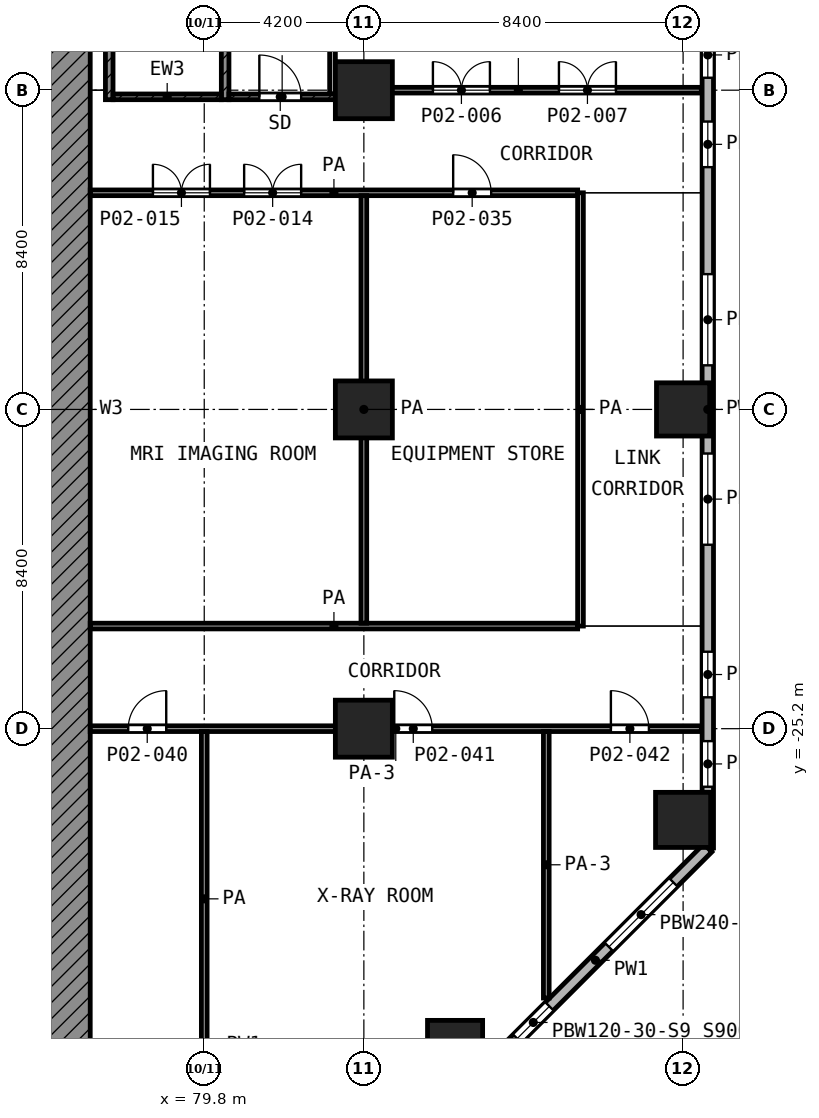
"""IFC4 building model, lengths in metres.
Left out: names, types, materials, properties, quantities, classifications, styles, units other than length and angle.
Written with IfcOpenShell. Run it as: python <this file> out.ifc"""

import sys

from ifc_helpers import new_model, si_unit, direction, frame, frame_2d, origin, origin_2d, place, context, subcontext, project, spatial, polyline, rectangle, outline, extrude, element, fill, save


model = new_model("IFC4")
c1 = context("Model", 3, precision=1e-05, world=origin(), true_north=direction((0.0, 1.0)))
c2 = subcontext(c1, "Body", "Model", "MODEL_VIEW")
j1 = project(units=[si_unit("LENGTHUNIT", "METRE"), si_unit("PLANEANGLEUNIT", "RADIAN")], contexts=[c1])
p1 = place(None, origin())
s1 = spatial("IfcSite", under=j1, at=p1, CompositionType="ELEMENT")
p2 = place(p1, origin())
s2 = spatial("IfcBuilding", under=s1, at=p2, CompositionType="ELEMENT")
p3 = place(p2, frame((0.0, 0.0, 7.0)))
s3 = spatial("IfcBuildingStorey", under=s2, at=p3, CompositionType="ELEMENT", Elevation=7.0)
for number, where, z_axis, x_axis in (
    (1, (84.0, -8.4, 0.0), (0.0, 0.0, 1.0), (1.0, 0.0, 0.0)),
    (2, (84.0, -16.8, 0.0), (0.0, 0.0, 1.0), (1.0, 0.0, 0.0)),
):
    element("IfcColumn", number, at=place(p3, frame(where, z_axis=z_axis, x_axis=x_axis)), inside=s3, PredefinedType="COLUMN", context=c2, shape_type="SweptSolid", body=[
        extrude(rectangle(XDim=1.5, YDim=1.5, at=origin_2d()), origin(), (0.0, 0.0, 1.0), 5.6),
    ])
p4 = place(p3, frame((92.4, -16.8, 0.0), z_axis=(0.0, 0.0, 1.0), x_axis=(1.0, 0.0, 0.0)))
e3 = element("IfcColumn", 3, at=p4, inside=s3, PredefinedType="COLUMN", context=c2, shape_type="SweptSolid", body=[
    extrude(rectangle(XDim=1.4, YDim=1.4, at=origin_2d()), origin(), (0.0, 0.0, 1.0), 5.6),
])
p5 = place(p3, frame((84.0, -25.2, 0.0), z_axis=(0.0, 0.0, 1.0), x_axis=(1.0, 0.0, 0.0)))
e4 = element("IfcColumn", 4, at=p5, inside=s3, PredefinedType="COLUMN", context=c2, shape_type="SweptSolid", body=[
    extrude(rectangle(XDim=1.5, YDim=1.5, at=origin_2d()), origin(), (0.0, 0.0, 1.0), 5.6),
])
for number, where, z_axis, x_axis in (
    (5, (92.4, -27.6, 0.0), (0.0, 0.0, 1.0), (1.0, 0.0, 0.0)),
    (6, (86.4, -33.6, 0.0), (0.0, 0.0, 1.0), (1.0, 0.0, 0.0)),
):
    element("IfcColumn", number, at=place(p3, frame(where, z_axis=z_axis, x_axis=x_axis)), inside=s3, PredefinedType="COLUMN", context=c2, shape_type="SweptSolid", body=[
        extrude(rectangle(XDim=1.45, YDim=1.45, at=origin_2d()), origin(), (0.0, 0.0, 1.0), 5.6),
    ])
p6 = place(p3, frame((0.0, 0.0, -7.0), z_axis=(0.0, -1.0, 0.0), x_axis=(1.0, 0.0, 0.0)))
e7 = element("IfcWall", 7, at=p6, inside=s3, PredefinedType="SHEAR", context=c2, shape_type="SweptSolid", body=[
    extrude(outline(polyline([(74.4, 7.0), (74.4, 9.0), (74.241, 11.256), (73.952, 12.6), (76.8, 12.6), (76.8, 7.0), (74.4, 7.0)])), origin(), (0.0, 0.0, 1.0), 33.6),
])
p7 = place(p3, frame((93.05, -28.338, 0.0), z_axis=(0.0, 0.0, 1.0), x_axis=(0.0, 1.0, 0.0)))
e8 = element("IfcWall", 8, at=p7, inside=s3, PredefinedType="SOLIDWALL", context=c2, shape_type="SweptSolid", body=[
    extrude(rectangle(XDim=23.076, YDim=0.3, at=frame_2d((11.538, 0.0))), origin(), (0.0, 0.0, 1.0), 5.25),
])
p8 = place(p7, frame((1.61, 0.0, 0.9)))
e9 = element("IfcOpeningElement", 9, at=p8, cuts=e8, PredefinedType="OPENING", context=c2, shape_type="SweptSolid", body=[
    extrude(rectangle(XDim=1.2, YDim=3.0, at=frame_2d((0.6, 1.5))), frame((0.0, 0.16, 0.0), z_axis=(0.0, -1.0, 0.0), x_axis=(1.0, 0.0, 0.0)), (0.0, 0.0, 1.0), 0.32),
])
p9 = place(p7, frame((3.963, 0.0, 0.9)))
e10 = element("IfcOpeningElement", 10, at=p9, cuts=e8, PredefinedType="OPENING", context=c2, shape_type="SweptSolid", body=[
    extrude(rectangle(XDim=1.2, YDim=3.0, at=frame_2d((0.6, 1.5))), frame((0.0, 0.16, 0.0), z_axis=(0.0, -1.0, 0.0), x_axis=(1.0, 0.0, 0.0)), (0.0, 0.0, 1.0), 0.32),
])
p10 = place(p7, frame((7.978, 0.0, 0.9)))
e11 = element("IfcOpeningElement", 11, at=p10, cuts=e8, PredefinedType="OPENING", context=c2, shape_type="SweptSolid", body=[
    extrude(rectangle(XDim=2.4, YDim=3.0, at=frame_2d((1.2, 1.5))), frame((0.0, 0.16, 0.0), z_axis=(0.0, -1.0, 0.0), x_axis=(1.0, 0.0, 0.0)), (0.0, 0.0, 1.0), 0.32),
])
p11 = place(p7, frame((12.698, 0.0, 0.9)))
e12 = element("IfcOpeningElement", 12, at=p11, cuts=e8, PredefinedType="OPENING", context=c2, shape_type="SweptSolid", body=[
    extrude(rectangle(XDim=2.4, YDim=3.0, at=frame_2d((1.2, 1.5))), frame((0.0, 0.16, 0.0), z_axis=(0.0, -1.0, 0.0), x_axis=(1.0, 0.0, 0.0)), (0.0, 0.0, 1.0), 0.32),
])
p12 = place(p7, frame((17.913, 0.0, 0.9)))
e13 = element("IfcOpeningElement", 13, at=p12, cuts=e8, PredefinedType="OPENING", context=c2, shape_type="SweptSolid", body=[
    extrude(rectangle(XDim=1.2, YDim=3.0, at=frame_2d((0.6, 1.5))), frame((0.0, 0.16, 0.0), z_axis=(0.0, -1.0, 0.0), x_axis=(1.0, 0.0, 0.0)), (0.0, 0.0, 1.0), 0.32),
])
p13 = place(p7, frame((20.265, 0.0, 0.9)))
e14 = element("IfcOpeningElement", 14, at=p13, cuts=e8, PredefinedType="OPENING", context=c2, shape_type="SweptSolid", body=[
    extrude(rectangle(XDim=1.2, YDim=3.0, at=frame_2d((0.6, 1.5))), frame((0.0, 0.16, 0.0), z_axis=(0.0, -1.0, 0.0), x_axis=(1.0, 0.0, 0.0)), (0.0, 0.0, 1.0), 0.32),
])
p14 = place(p3, frame((87.138, -34.25, 0.0), z_axis=(0.0, 0.0, 1.0), x_axis=(0.707106781187, 0.707106781187, 0.0)))
e15 = element("IfcWall", 15, at=p14, inside=s3, PredefinedType="SOLIDWALL", context=c2, shape_type="SweptSolid", body=[
    extrude(rectangle(XDim=8.361, YDim=0.3, at=frame_2d((4.181, 0.0))), origin(), (0.0, 0.0, 1.0), 5.25),
])
p15 = place(p14, frame((1.267, 0.0, 0.9)))
e16 = element("IfcOpeningElement", 16, at=p15, cuts=e15, PredefinedType="OPENING", context=c2, shape_type="SweptSolid", body=[
    extrude(rectangle(XDim=1.2, YDim=3.0, at=frame_2d((0.6, 1.5))), frame((0.0, 0.16, 0.0), z_axis=(0.0, -1.0, 0.0), x_axis=(1.0, 0.0, 0.0)), (0.0, 0.0, 1.0), 0.32),
])
p16 = place(p14, frame((4.679, 0.0, 0.9)))
e17 = element("IfcOpeningElement", 17, at=p16, cuts=e15, PredefinedType="OPENING", context=c2, shape_type="SweptSolid", body=[
    extrude(rectangle(XDim=2.4, YDim=3.0, at=frame_2d((1.2, 1.5))), frame((0.0, 0.16, 0.0), z_axis=(0.0, -1.0, 0.0), x_axis=(1.0, 0.0, 0.0)), (0.0, 0.0, 1.0), 0.32),
])
p17 = place(p3, frame((77.3, -8.65, 0.0), z_axis=(0.0, 0.0, 1.0), x_axis=(0.0, 1.0, 0.0)))
e18 = element("IfcWall", 18, at=p17, inside=s3, PredefinedType="SHEAR", context=c2, shape_type="SweptSolid", body=[
    extrude(rectangle(XDim=8.35, YDim=0.2, at=frame_2d((4.175, 0.0))), origin(), (0.0, 0.0, 1.0), 5.25),
])
p18 = place(p3, frame((80.35, -8.65, 0.0), z_axis=(0.0, 0.0, 1.0), x_axis=(0.0, 1.0, 0.0)))
e19 = element("IfcWall", 19, at=p18, inside=s3, PredefinedType="SHEAR", context=c2, shape_type="SweptSolid", body=[
    extrude(rectangle(XDim=8.35, YDim=0.2, at=frame_2d((4.175, 0.0))), origin(), (0.0, 0.0, 1.0), 5.25),
])
p19 = place(p18, frame((6.95, 0.0, 0.0)))
e20 = element("IfcOpeningElement", 20, at=p19, cuts=e19, PredefinedType="OPENING", context=c2, shape_type="SweptSolid", body=[
    extrude(rectangle(XDim=1.1, YDim=2.1, at=frame_2d((0.55, 1.05))), frame((0.0, 0.11, 0.0), z_axis=(0.0, -1.0, 0.0), x_axis=(1.0, 0.0, 0.0)), (0.0, 0.0, 1.0), 0.22),
])
p20 = place(p3, frame((77.4, -8.575, 0.0), z_axis=(0.0, 0.0, 1.0), x_axis=(1.0, 0.0, 0.0)))
e21 = element("IfcWall", 21, at=p20, inside=s3, PredefinedType="SHEAR", context=c2, shape_type="SweptSolid", body=[
    extrude(rectangle(XDim=2.85, YDim=0.15, at=frame_2d((1.425, 0.0))), origin(), (0.0, 0.0, 1.0), 5.25),
])
p21 = place(p3, frame((80.45, -8.575, 0.0), z_axis=(0.0, 0.0, 1.0), x_axis=(1.0, 0.0, 0.0)))
e22 = element("IfcWall", 22, at=p21, inside=s3, PredefinedType="SHEAR", context=c2, shape_type="SweptSolid", body=[
    extrude(rectangle(XDim=2.8, YDim=0.15, at=frame_2d((1.4, 0.0))), origin(), (0.0, 0.0, 1.0), 5.25),
])
p22 = place(p21, frame((0.8, 0.0, 0.0)))
e23 = element("IfcOpeningElement", 23, at=p22, cuts=e22, PredefinedType="OPENING", context=c2, shape_type="SweptSolid", body=[
    extrude(rectangle(XDim=1.1, YDim=2.1, at=frame_2d((0.55, 1.05))), frame((0.0, 0.085, 0.0), z_axis=(0.0, -1.0, 0.0), x_axis=(1.0, 0.0, 0.0)), (0.0, 0.0, 1.0), 0.17),
])
p23 = place(p3, frame((83.175, -8.5, 0.0), z_axis=(0.0, 0.0, 1.0), x_axis=(0.0, 1.0, 0.0)))
e24 = element("IfcWall", 24, at=p23, inside=s3, PredefinedType="PARTITIONING", context=c2, shape_type="SweptSolid", body=[
    extrude(rectangle(XDim=8.05, YDim=0.15, at=frame_2d((4.025, 0.0))), origin(), (0.0, 0.0, 1.0), 5.25),
])
p24 = place(p3, frame((76.8, -25.2, 0.0), z_axis=(0.0, 0.0, 1.0), x_axis=(1.0, 0.0, 0.0)))
e25 = element("IfcWall", 25, at=p24, inside=s3, PredefinedType="PARTITIONING", context=c2, shape_type="SweptSolid", body=[
    extrude(rectangle(XDim=16.08, YDim=0.15, at=frame_2d((8.04, 0.0))), origin(), (0.0, 0.0, 1.0), 3.85),
])
p25 = place(p24, frame((1.0, 0.0, 0.0)))
e26 = element("IfcOpeningElement", 26, at=p25, cuts=e25, PredefinedType="OPENING", context=c2, shape_type="SweptSolid", body=[
    extrude(rectangle(XDim=1.0, YDim=2.1, at=frame_2d((0.5, 1.05))), frame((0.0, 0.085, 0.0), z_axis=(0.0, -1.0, 0.0), x_axis=(1.0, 0.0, 0.0)), (0.0, 0.0, 1.0), 0.17),
])
p26 = place(p24, frame((8.0, 0.0, 0.0)))
e27 = element("IfcOpeningElement", 27, at=p26, cuts=e25, PredefinedType="OPENING", context=c2, shape_type="SweptSolid", body=[
    extrude(rectangle(XDim=1.0, YDim=2.1, at=frame_2d((0.5, 1.05))), frame((0.0, 0.085, 0.0), z_axis=(0.0, -1.0, 0.0), x_axis=(1.0, 0.0, 0.0)), (0.0, 0.0, 1.0), 0.17),
])
p27 = place(p24, frame((13.7, 0.0, 0.0)))
e28 = element("IfcOpeningElement", 28, at=p27, cuts=e25, PredefinedType="OPENING", context=c2, shape_type="SweptSolid", body=[
    extrude(rectangle(XDim=1.0, YDim=2.1, at=frame_2d((0.5, 1.05))), frame((0.0, 0.085, 0.0), z_axis=(0.0, -1.0, 0.0), x_axis=(1.0, 0.0, 0.0)), (0.0, 0.0, 1.0), 0.17),
])
p28 = place(p3, frame((76.8, -22.5, 0.0), z_axis=(0.0, 0.0, 1.0), x_axis=(1.0, 0.0, 0.0)))
e29 = element("IfcWall", 29, at=p28, inside=s3, PredefinedType="PARTITIONING", context=c2, shape_type="SweptSolid", body=[
    extrude(rectangle(XDim=12.825, YDim=0.15, at=frame_2d((6.413, 0.0))), origin(), (0.0, 0.0, 1.0), 5.25),
])
p29 = place(p3, frame((76.8, -11.1, 0.0), z_axis=(0.0, 0.0, 1.0), x_axis=(1.0, 0.0, 0.0)))
e30 = element("IfcWall", 30, at=p29, inside=s3, PredefinedType="PARTITIONING", context=c2, shape_type="SweptSolid", body=[
    extrude(rectangle(XDim=12.825, YDim=0.15, at=frame_2d((6.413, 0.0))), origin(), (0.0, 0.0, 1.0), 5.25),
])
p30 = place(p29, frame((4.05, 0.0, 0.0)))
e31 = element("IfcOpeningElement", 31, at=p30, cuts=e30, PredefinedType="OPENING", context=c2, shape_type="SweptSolid", body=[
    extrude(rectangle(XDim=1.5, YDim=2.1, at=frame_2d((0.75, 1.05))), frame((0.0, 0.085, 0.0), z_axis=(0.0, -1.0, 0.0), x_axis=(1.0, 0.0, 0.0)), (0.0, 0.0, 1.0), 0.17),
])
p31 = place(p29, frame((1.65, 0.0, 0.0)))
e32 = element("IfcOpeningElement", 32, at=p31, cuts=e30, PredefinedType="OPENING", context=c2, shape_type="SweptSolid", body=[
    extrude(rectangle(XDim=1.5, YDim=2.1, at=frame_2d((0.75, 1.05))), frame((0.0, 0.085, 0.0), z_axis=(0.0, -1.0, 0.0), x_axis=(1.0, 0.0, 0.0)), (0.0, 0.0, 1.0), 0.17),
])
p32 = place(p29, frame((9.55, 0.0, 0.0)))
e33 = element("IfcOpeningElement", 33, at=p32, cuts=e30, PredefinedType="OPENING", context=c2, shape_type="SweptSolid", body=[
    extrude(rectangle(XDim=1.0, YDim=2.1, at=frame_2d((0.5, 1.05))), frame((0.0, 0.085, 0.0), z_axis=(0.0, -1.0, 0.0), x_axis=(1.0, 0.0, 0.0)), (0.0, 0.0, 1.0), 0.17),
])
p33 = place(p3, frame((83.25, -8.4, 0.0), z_axis=(0.0, 0.0, 1.0), x_axis=(1.0, 0.0, 0.0)))
e34 = element("IfcWall", 34, at=p33, inside=s3, PredefinedType="PARTITIONING", context=c2, shape_type="SweptSolid", body=[
    extrude(rectangle(XDim=9.63, YDim=0.15, at=frame_2d((4.815, 0.0))), origin(), (0.0, 0.0, 1.0), 3.85),
])
p34 = place(p33, frame((2.567, 0.0, 0.0)))
e35 = element("IfcOpeningElement", 35, at=p34, cuts=e34, PredefinedType="OPENING", context=c2, shape_type="SweptSolid", body=[
    extrude(rectangle(XDim=1.5, YDim=2.1, at=frame_2d((0.75, 1.05))), frame((0.0, 0.085, 0.0), z_axis=(0.0, -1.0, 0.0), x_axis=(1.0, 0.0, 0.0)), (0.0, 0.0, 1.0), 0.17),
])
p35 = place(p33, frame((5.883, 0.0, 0.0)))
e36 = element("IfcOpeningElement", 36, at=p35, cuts=e34, PredefinedType="OPENING", context=c2, shape_type="SweptSolid", body=[
    extrude(rectangle(XDim=1.5, YDim=2.1, at=frame_2d((0.75, 1.05))), frame((0.0, 0.085, 0.0), z_axis=(0.0, -1.0, 0.0), x_axis=(1.0, 0.0, 0.0)), (0.0, 0.0, 1.0), 0.17),
])
p36 = place(p3, frame((79.8, -34.08, 0.0), z_axis=(0.0, 0.0, 1.0), x_axis=(0.0, 1.0, 0.0)))
e37 = element("IfcWall", 37, at=p36, inside=s3, PredefinedType="PARTITIONING", context=c2, shape_type="SweptSolid", body=[
    extrude(rectangle(XDim=8.805, YDim=0.15, at=frame_2d((4.403, 0.0))), origin(), (0.0, 0.0, 1.0), 5.25),
])
p37 = place(p3, frame((84.0, -22.425, 0.0), z_axis=(0.0, 0.0, 1.0), x_axis=(0.0, 1.0, 0.0)))
e38 = element("IfcWall", 38, at=p37, inside=s3, PredefinedType="PARTITIONING", context=c2, shape_type="SweptSolid", body=[
    extrude(rectangle(XDim=11.25, YDim=0.15, at=frame_2d((5.625, 0.0))), origin(), (0.0, 0.0, 1.0), 5.25),
])
p38 = place(p3, frame((88.8, -32.287, 0.0), z_axis=(0.0, 0.0, 1.0), x_axis=(0.0, 1.0, 0.0)))
e39 = element("IfcWall", 39, at=p38, inside=s3, PredefinedType="PARTITIONING", context=c2, shape_type="SweptSolid", body=[
    extrude(rectangle(XDim=7.012, YDim=0.15, at=frame_2d((3.506, 0.0))), origin(), (0.0, 0.0, 1.0), 3.85),
])
p39 = place(p3, frame((89.7, -22.5, 0.0), z_axis=(0.0, 0.0, 1.0), x_axis=(0.0, 1.0, 0.0)))
e40 = element("IfcWall", 40, at=p39, inside=s3, PredefinedType="PARTITIONING", context=c2, shape_type="SweptSolid", body=[
    extrude(rectangle(XDim=11.4, YDim=0.15, at=frame_2d((5.7, 0.0))), origin(), (0.0, 0.0, 1.0), 5.25),
])
p40 = place(p8, origin())
e41 = element("IfcWindow", 41, at=p40, inside=s3, PartitioningType="SINGLE_PANEL", PredefinedType="WINDOW", context=c2, shape_type="SweptSolid", body=[
    extrude(rectangle(XDim=1.2, YDim=3.0, at=frame_2d((0.6, 1.5))), frame((0.0, 0.03, 0.0), z_axis=(0.0, -1.0, 0.0), x_axis=(1.0, 0.0, 0.0)), (0.0, 0.0, 1.0), 0.06),
])
fill(e9, e41)
p41 = place(p9, origin())
e42 = element("IfcWindow", 42, at=p41, inside=s3, PartitioningType="SINGLE_PANEL", PredefinedType="WINDOW", context=c2, shape_type="SweptSolid", body=[
    extrude(rectangle(XDim=1.2, YDim=3.0, at=frame_2d((0.6, 1.5))), frame((0.0, 0.03, 0.0), z_axis=(0.0, -1.0, 0.0), x_axis=(1.0, 0.0, 0.0)), (0.0, 0.0, 1.0), 0.06),
])
fill(e10, e42)
p42 = place(p10, origin())
e43 = element("IfcWindow", 43, at=p42, inside=s3, PartitioningType="SINGLE_PANEL", PredefinedType="WINDOW", context=c2, shape_type="SweptSolid", body=[
    extrude(rectangle(XDim=2.4, YDim=3.0, at=frame_2d((1.2, 1.5))), frame((0.0, 0.03, 0.0), z_axis=(0.0, -1.0, 0.0), x_axis=(1.0, 0.0, 0.0)), (0.0, 0.0, 1.0), 0.06),
])
fill(e11, e43)
p43 = place(p11, origin())
e44 = element("IfcWindow", 44, at=p43, inside=s3, PartitioningType="SINGLE_PANEL", PredefinedType="WINDOW", context=c2, shape_type="SweptSolid", body=[
    extrude(rectangle(XDim=2.4, YDim=3.0, at=frame_2d((1.2, 1.5))), frame((0.0, 0.03, 0.0), z_axis=(0.0, -1.0, 0.0), x_axis=(1.0, 0.0, 0.0)), (0.0, 0.0, 1.0), 0.06),
])
fill(e12, e44)
p44 = place(p12, origin())
e45 = element("IfcWindow", 45, at=p44, inside=s3, PartitioningType="SINGLE_PANEL", PredefinedType="WINDOW", context=c2, shape_type="SweptSolid", body=[
    extrude(rectangle(XDim=1.2, YDim=3.0, at=frame_2d((0.6, 1.5))), frame((0.0, 0.03, 0.0), z_axis=(0.0, -1.0, 0.0), x_axis=(1.0, 0.0, 0.0)), (0.0, 0.0, 1.0), 0.06),
])
fill(e13, e45)
p45 = place(p13, origin())
e46 = element("IfcWindow", 46, at=p45, inside=s3, PartitioningType="SINGLE_PANEL", PredefinedType="WINDOW", context=c2, shape_type="SweptSolid", body=[
    extrude(rectangle(XDim=1.2, YDim=3.0, at=frame_2d((0.6, 1.5))), frame((0.0, 0.03, 0.0), z_axis=(0.0, -1.0, 0.0), x_axis=(1.0, 0.0, 0.0)), (0.0, 0.0, 1.0), 0.06),
])
fill(e14, e46)
p46 = place(p15, origin())
e47 = element("IfcWindow", 47, at=p46, inside=s3, PartitioningType="SINGLE_PANEL", PredefinedType="WINDOW", context=c2, shape_type="SweptSolid", body=[
    extrude(rectangle(XDim=1.2, YDim=3.0, at=frame_2d((0.6, 1.5))), frame((0.0, 0.03, 0.0), z_axis=(0.0, -1.0, 0.0), x_axis=(1.0, 0.0, 0.0)), (0.0, 0.0, 1.0), 0.06),
])
fill(e16, e47)
p47 = place(p16, origin())
e48 = element("IfcWindow", 48, at=p47, inside=s3, PartitioningType="SINGLE_PANEL", PredefinedType="WINDOW", context=c2, shape_type="SweptSolid", body=[
    extrude(rectangle(XDim=2.4, YDim=3.0, at=frame_2d((1.2, 1.5))), frame((0.0, 0.03, 0.0), z_axis=(0.0, -1.0, 0.0), x_axis=(1.0, 0.0, 0.0)), (0.0, 0.0, 1.0), 0.06),
])
fill(e17, e48)
p48 = place(p22, origin())
e49 = element("IfcDoor", 49, at=p48, inside=s3, OperationType="SINGLE_SWING_LEFT", PredefinedType="DOOR", context=c2, shape_type="SweptSolid", body=[
    extrude(rectangle(XDim=1.1, YDim=2.1, at=frame_2d((0.55, 1.05))), frame((0.0, 0.025, 0.0), z_axis=(0.0, -1.0, 0.0), x_axis=(1.0, 0.0, 0.0)), (0.0, 0.0, 1.0), 0.05),
])
fill(e23, e49)
p49 = place(p34, origin())
e50 = element("IfcDoor", 50, at=p49, inside=s3, OperationType="DOUBLE_DOOR_SINGLE_SWING", PredefinedType="DOOR", context=c2, shape_type="SweptSolid", body=[
    extrude(rectangle(XDim=1.5, YDim=2.1, at=frame_2d((0.75, 1.05))), frame((0.0, 0.025, 0.0), z_axis=(0.0, -1.0, 0.0), x_axis=(1.0, 0.0, 0.0)), (0.0, 0.0, 1.0), 0.05),
])
fill(e35, e50)
p50 = place(p35, origin())
e51 = element("IfcDoor", 51, at=p50, inside=s3, OperationType="DOUBLE_DOOR_SINGLE_SWING", PredefinedType="DOOR", context=c2, shape_type="SweptSolid", body=[
    extrude(rectangle(XDim=1.5, YDim=2.1, at=frame_2d((0.75, 1.05))), frame((0.0, 0.025, 0.0), z_axis=(0.0, -1.0, 0.0), x_axis=(1.0, 0.0, 0.0)), (0.0, 0.0, 1.0), 0.05),
])
fill(e36, e51)
p51 = place(p30, origin())
e52 = element("IfcDoor", 52, at=p51, inside=s3, OperationType="DOUBLE_DOOR_SINGLE_SWING", PredefinedType="DOOR", context=c2, shape_type="SweptSolid", body=[
    extrude(rectangle(XDim=1.5, YDim=2.1, at=frame_2d((0.75, 1.05))), frame((0.0, 0.025, 0.0), z_axis=(0.0, -1.0, 0.0), x_axis=(1.0, 0.0, 0.0)), (0.0, 0.0, 1.0), 0.05),
])
fill(e31, e52)
p52 = place(p31, origin())
e53 = element("IfcDoor", 53, at=p52, inside=s3, OperationType="DOUBLE_DOOR_SINGLE_SWING", PredefinedType="DOOR", context=c2, shape_type="SweptSolid", body=[
    extrude(rectangle(XDim=1.5, YDim=2.1, at=frame_2d((0.75, 1.05))), frame((0.0, 0.025, 0.0), z_axis=(0.0, -1.0, 0.0), x_axis=(1.0, 0.0, 0.0)), (0.0, 0.0, 1.0), 0.05),
])
fill(e32, e53)
p53 = place(p32, origin())
e54 = element("IfcDoor", 54, at=p53, inside=s3, OperationType="SINGLE_SWING_LEFT", PredefinedType="DOOR", context=c2, shape_type="SweptSolid", body=[
    extrude(rectangle(XDim=1.0, YDim=2.1, at=frame_2d((0.5, 1.05))), frame((0.0, 0.025, 0.0), z_axis=(0.0, -1.0, 0.0), x_axis=(1.0, 0.0, 0.0)), (0.0, 0.0, 1.0), 0.05),
])
fill(e33, e54)
p54 = place(p25, origin())
e55 = element("IfcDoor", 55, at=p54, inside=s3, OperationType="SINGLE_SWING_RIGHT", PredefinedType="DOOR", context=c2, shape_type="SweptSolid", body=[
    extrude(rectangle(XDim=1.0, YDim=2.1, at=frame_2d((0.5, 1.05))), frame((0.0, 0.025, 0.0), z_axis=(0.0, -1.0, 0.0), x_axis=(1.0, 0.0, 0.0)), (0.0, 0.0, 1.0), 0.05),
])
fill(e26, e55)
p55 = place(p26, origin())
e56 = element("IfcDoor", 56, at=p55, inside=s3, OperationType="SINGLE_SWING_LEFT", PredefinedType="DOOR", context=c2, shape_type="SweptSolid", body=[
    extrude(rectangle(XDim=1.0, YDim=2.1, at=frame_2d((0.5, 1.05))), frame((0.0, 0.025, 0.0), z_axis=(0.0, -1.0, 0.0), x_axis=(1.0, 0.0, 0.0)), (0.0, 0.0, 1.0), 0.05),
])
fill(e27, e56)
p56 = place(p27, origin())
e57 = element("IfcDoor", 57, at=p56, inside=s3, OperationType="SINGLE_SWING_LEFT", PredefinedType="DOOR", context=c2, shape_type="SweptSolid", body=[
    extrude(rectangle(XDim=1.0, YDim=2.1, at=frame_2d((0.5, 1.05))), frame((0.0, 0.025, 0.0), z_axis=(0.0, -1.0, 0.0), x_axis=(1.0, 0.0, 0.0)), (0.0, 0.0, 1.0), 0.05),
])
fill(e28, e57)
save(model, sys.argv[1])
